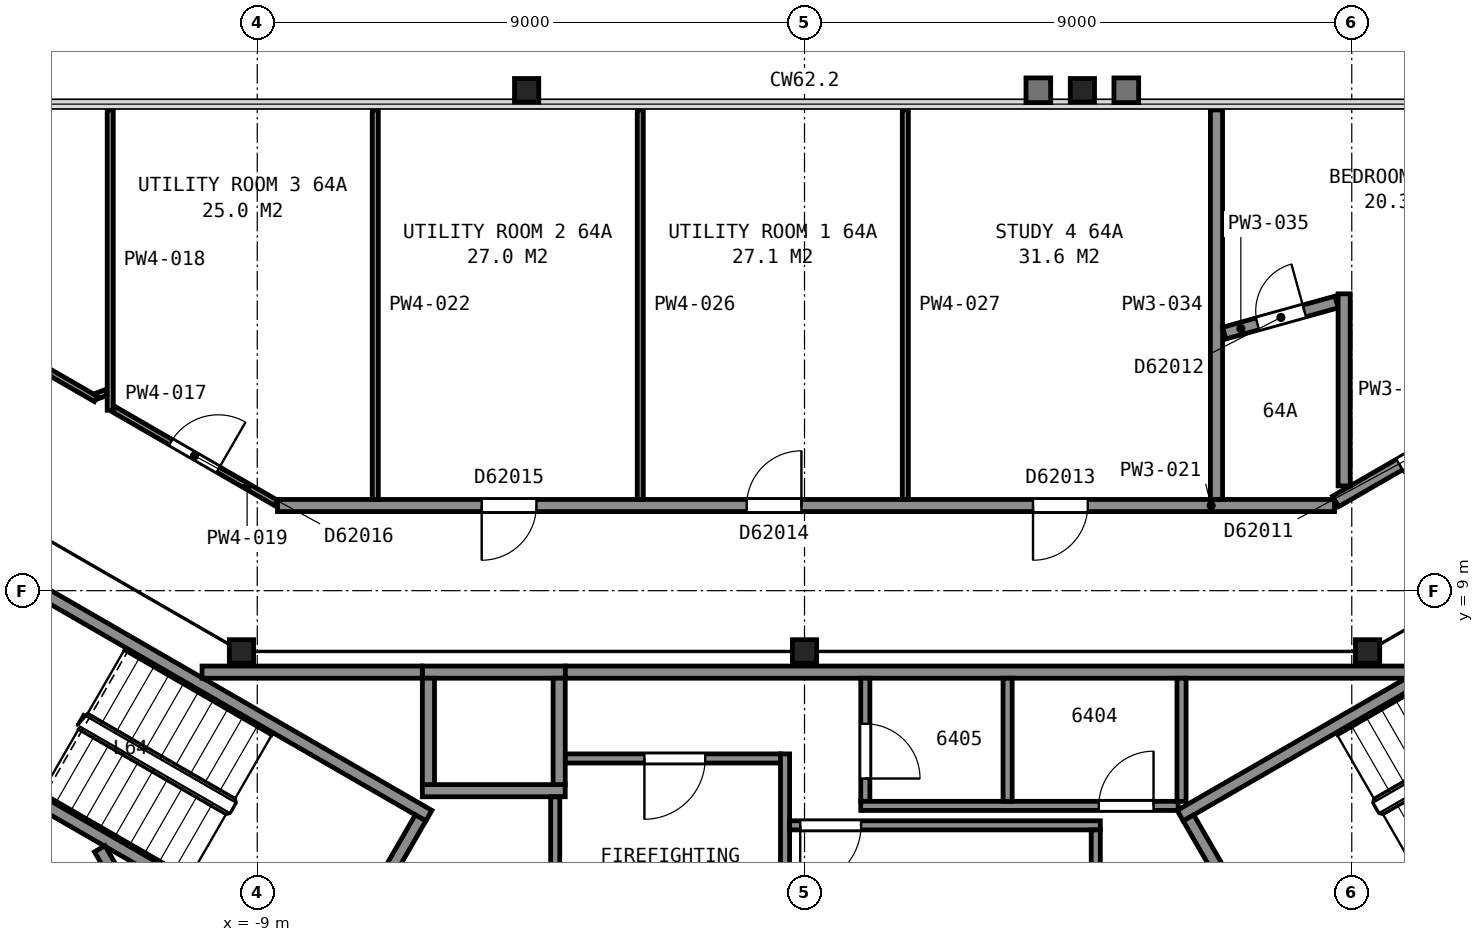
"""IFC4 building model, lengths in metres.
Left out: names, types, materials, properties, quantities, classifications, styles, units other than length and angle.
Written with IfcOpenShell. Run it as: python <this file> out.ifc"""

import sys

from ifc_helpers import new_model, si_unit, direction, frame, frame_2d, origin, origin_2d, place, context, subcontext, project, spatial, rectangle, i_section, extrude, element, fill, save


model = new_model("IFC4")
c1 = context("Model", 3, precision=1e-05, world=origin(), true_north=direction((0.0, 1.0)))
c2 = subcontext(c1, "Body", "Model", "MODEL_VIEW")
j1 = project(units=[si_unit("LENGTHUNIT", "METRE"), si_unit("PLANEANGLEUNIT", "RADIAN")], contexts=[c1])
p1 = place(None, origin())
s1 = spatial("IfcSite", under=j1, at=p1, CompositionType="ELEMENT")
p2 = place(p1, origin())
s2 = spatial("IfcBuilding", under=s1, at=p2, CompositionType="ELEMENT")
p3 = place(p2, frame((0.0, 0.0, 254.5)))
s3 = spatial("IfcBuildingStorey", under=s2, at=p3, CompositionType="ELEMENT", Elevation=254.5)
for number, where, z_axis, x_axis in (
    (1, (4.57, 17.23, 0.0), (0.0, 0.0, 1.0), (1.0, 0.0, 0.0)),
    (2, (-4.57, 17.23, 0.0), (0.0, 0.0, 1.0), (1.0, 0.0, 0.0)),
):
    element("IfcColumn", number, at=place(p3, frame(where, z_axis=z_axis, x_axis=x_axis)), inside=s3, PredefinedType="COLUMN", context=c2, shape_type="SweptSolid", body=[
        extrude(i_section(OverallWidth=0.399, OverallDepth=0.386, WebThickness=0.021, FlangeThickness=0.033, FilletRadius=0.015, at=origin_2d()), origin(), (0.0, 0.0, 1.0), 3.01),
    ])
p4 = place(p3, frame((9.26, 8.0, 0.0), z_axis=(0.0, 0.0, 1.0), x_axis=(1.0, 0.0, 0.0)))
e3 = element("IfcColumn", 3, at=p4, inside=s3, PredefinedType="COLUMN", context=c2, shape_type="SweptSolid", body=[
    extrude(i_section(OverallWidth=0.399, OverallDepth=0.386, WebThickness=0.021, FlangeThickness=0.033, FilletRadius=0.015, at=origin_2d()), origin(), (0.0, 0.0, 1.0), 3.635),
])
p5 = place(p3, frame((0.0, 8.0, 0.0), z_axis=(0.0, 0.0, 1.0), x_axis=(1.0, 0.0, 0.0)))
e4 = element("IfcColumn", 4, at=p5, inside=s3, PredefinedType="COLUMN", context=c2, shape_type="SweptSolid", body=[
    extrude(i_section(OverallWidth=0.399, OverallDepth=0.386, WebThickness=0.021, FlangeThickness=0.033, FilletRadius=0.015, at=origin_2d()), origin(), (0.0, 0.0, 1.0), 3.67),
])
p6 = place(p3, frame((-9.26, 8.0, 0.0), z_axis=(0.0, 0.0, 1.0), x_axis=(1.0, 0.0, 0.0)))
e5 = element("IfcColumn", 5, at=p6, inside=s3, PredefinedType="COLUMN", context=c2, shape_type="SweptSolid", body=[
    extrude(i_section(OverallWidth=0.399, OverallDepth=0.386, WebThickness=0.021, FlangeThickness=0.033, FilletRadius=0.015, at=origin_2d()), origin(), (0.0, 0.0, 1.0), 3.635),
])
for number, where, z_axis, x_axis in (
    (6, (6.178, 5.299, 0.0), (0.0, 0.0, 1.0), (0.866, 0.5, 0.0)),
    (7, (7.678, 2.701, 0.0), (0.0, 0.0, 1.0), (0.866, 0.5, 0.0)),
):
    element("IfcWall", number, at=place(p3, frame(where, z_axis=z_axis, x_axis=x_axis)), inside=s3, PredefinedType="PARTITIONING", context=c2, shape_type="SweptSolid", body=[
        extrude(rectangle(XDim=9.6, YDim=0.2, at=frame_2d((4.8, 0.0))), origin(), (0.0, 0.0, 1.0), 3.45),
    ])
p7 = place(p3, frame((7.715, 2.838, 0.0), z_axis=(0.0, 0.0, 1.0), x_axis=(-0.500049511043, 0.865996816683, 0.0)))
e8 = element("IfcWall", 8, at=p7, inside=s3, PredefinedType="PARTITIONING", context=c2, shape_type="SweptSolid", body=[
    extrude(rectangle(XDim=2.8, YDim=0.2, at=frame_2d((1.4, 0.0))), origin(), (0.0, 0.0, 1.0), 3.45),
])
for number, where, z_axis, x_axis in (
    (9, (-7.678, 2.701, 0.0), (0.0, 0.0, 1.0), (-0.866, 0.5, 0.0)),
    (10, (-6.178, 5.299, 0.0), (0.0, 0.0, 1.0), (-0.866, 0.5, 0.0)),
):
    element("IfcWall", number, at=place(p3, frame(where, z_axis=z_axis, x_axis=x_axis)), inside=s3, PredefinedType="PARTITIONING", context=c2, shape_type="SweptSolid", body=[
        extrude(rectangle(XDim=9.6, YDim=0.2, at=frame_2d((4.8, 0.0))), origin(), (0.0, 0.0, 1.0), 3.45),
    ])
p8 = place(p3, frame((-6.315, 5.262, 0.0), z_axis=(0.0, 0.0, 1.0), x_axis=(-0.500049511043, -0.865996816683, 0.0)))
e11 = element("IfcWall", 11, at=p8, inside=s3, PredefinedType="PARTITIONING", context=c2, shape_type="SweptSolid", body=[
    extrude(rectangle(XDim=2.8, YDim=0.2, at=frame_2d((1.4, 0.0))), origin(), (0.0, 0.0, 1.0), 3.45),
])
for number, where, z_axis, x_axis in (
    (12, (-6.285, 5.71, 0.0), (0.0, 0.0, 1.0), (1.0, 0.0, 0.0)),
    (13, (-6.285, 7.66, 0.0), (0.0, 0.0, 1.0), (1.0, 0.0, 0.0)),
):
    element("IfcWall", number, at=place(p3, frame(where, z_axis=z_axis, x_axis=x_axis)), inside=s3, PredefinedType="PARTITIONING", context=c2, shape_type="SweptSolid", body=[
        extrude(rectangle(XDim=2.35, YDim=0.2, at=frame_2d((1.175, 0.0))), origin(), (0.0, 0.0, 1.0), 3.7),
    ])
for number, where, z_axis, x_axis in (
    (14, (-4.035, 5.81, 0.0), (0.0, 0.0, 1.0), (0.0, 1.0, 0.0)),
    (15, (-6.185, 5.81, 0.0), (0.0, 0.0, 1.0), (0.0, 1.0, 0.0)),
):
    element("IfcWall", number, at=place(p3, frame(where, z_axis=z_axis, x_axis=x_axis)), inside=s3, PredefinedType="PARTITIONING", context=c2, shape_type="SweptSolid", body=[
        extrude(rectangle(XDim=1.75, YDim=0.2, at=frame_2d((0.875, 0.0))), origin(), (0.0, 0.0, 1.0), 3.7),
    ])
p9 = place(p3, frame((-11.591, 4.755, 0.0), z_axis=(0.0, 0.0, 1.0), x_axis=(0.500043977787, -0.866000011708, 0.0)))
e16 = element("IfcWall", 16, at=p9, inside=s3, PredefinedType="PARTITIONING", context=c2, shape_type="SweptSolid", body=[
    extrude(rectangle(XDim=6.617, YDim=0.2, at=frame_2d((3.308, 0.0))), origin(), (0.0, 0.0, 1.0), 3.45),
])
p10 = place(p9, frame((3.695, 0.0, 0.0)))
e17 = element("IfcOpeningElement", 17, at=p10, cuts=e16, PredefinedType="OPENING", context=c2, shape_type="SweptSolid", body=[
    extrude(rectangle(XDim=1.8, YDim=2.1, at=frame_2d((0.9, 1.05))), frame((0.0, 0.11, 0.0), z_axis=(0.0, -1.0, 0.0), x_axis=(1.0, 0.0, 0.0)), (0.0, 0.0, 1.0), 0.22),
])
p11 = place(p3, frame((-9.908, 7.66, 0.0), z_axis=(0.0, 0.0, 1.0), x_axis=(1.0, 0.0, 0.0)))
e18 = element("IfcWall", 18, at=p11, inside=s3, PredefinedType="PARTITIONING", context=c2, shape_type="SweptSolid", body=[
    extrude(rectangle(XDim=3.621, YDim=0.2, at=frame_2d((1.811, 0.0))), origin(), (0.0, 0.0, 1.0), 3.45),
])
p12 = place(p3, frame((-4.1, 2.085, 0.0), z_axis=(0.0, 0.0, 1.0), x_axis=(0.0, 1.0, 0.0)))
e19 = element("IfcWall", 19, at=p12, inside=s3, PredefinedType="PARTITIONING", context=c2, shape_type="SweptSolid", body=[
    extrude(rectangle(XDim=3.523, YDim=0.15, at=frame_2d((1.761, 0.0))), origin(), (0.0, 0.0, 1.0), 3.45),
])
p13 = place(p3, frame((-3.933, 6.24, 0.0), z_axis=(0.0, 0.0, 1.0), x_axis=(1.0, 0.0, 0.0)))
e20 = element("IfcWall", 20, at=p13, inside=s3, PredefinedType="PARTITIONING", context=c2, shape_type="SweptSolid", body=[
    extrude(rectangle(XDim=3.538, YDim=0.15, at=frame_2d((1.769, 0.0))), origin(), (0.0, 0.0, 1.0), 3.45),
])
p14 = place(p13, frame((1.3, 0.0, 0.0)))
e21 = element("IfcOpeningElement", 21, at=p14, cuts=e20, PredefinedType="OPENING", context=c2, shape_type="SweptSolid", body=[
    extrude(rectangle(XDim=1.0, YDim=2.1, at=frame_2d((0.5, 1.05))), frame((0.0, 0.085, 0.0), z_axis=(0.0, -1.0, 0.0), x_axis=(1.0, 0.0, 0.0)), (0.0, 0.0, 1.0), 0.17),
])
p15 = place(p3, frame((-3.933, 7.66, 0.0), z_axis=(0.0, 0.0, 1.0), x_axis=(1.0, 0.0, 0.0)))
e22 = element("IfcWall", 22, at=p15, inside=s3, PredefinedType="PARTITIONING", context=c2, shape_type="SweptSolid", body=[
    extrude(rectangle(XDim=13.841, YDim=0.2, at=frame_2d((6.92, 0.0))), origin(), (0.0, 0.0, 1.0), 3.45),
])
p16 = place(p3, frame((-0.32, 2.252, 0.0), z_axis=(0.0, 0.0, 1.0), x_axis=(0.0, 1.0, 0.0)))
e23 = element("IfcWall", 23, at=p16, inside=s3, PredefinedType="PARTITIONING", context=c2, shape_type="SweptSolid", body=[
    extrude(rectangle(XDim=4.063, YDim=0.15, at=frame_2d((2.031, 0.0))), origin(), (0.0, 0.0, 1.0), 3.45),
])
p17 = place(p3, frame((-0.245, 5.14, 0.0), z_axis=(0.0, 0.0, 1.0), x_axis=(1.0, 0.0, 0.0)))
e24 = element("IfcWall", 24, at=p17, inside=s3, PredefinedType="PARTITIONING", context=c2, shape_type="SweptSolid", body=[
    extrude(rectangle(XDim=5.11, YDim=0.15, at=frame_2d((2.555, 0.0))), origin(), (0.0, 0.0, 1.0), 3.45),
])
p18 = place(p17, frame((0.175, 0.0, 0.0)))
e25 = element("IfcOpeningElement", 25, at=p18, cuts=e24, PredefinedType="OPENING", context=c2, shape_type="SweptSolid", body=[
    extrude(rectangle(XDim=1.0, YDim=2.1, at=frame_2d((0.5, 1.05))), frame((0.0, 0.085, 0.0), z_axis=(0.0, -1.0, 0.0), x_axis=(1.0, 0.0, 0.0)), (0.0, 0.0, 1.0), 0.17),
])
p19 = place(p3, frame((1.0, 7.56, 0.0), z_axis=(0.0, 0.0, 1.0), x_axis=(0.0, -1.0, 0.0)))
e26 = element("IfcWall", 26, at=p19, inside=s3, PredefinedType="PARTITIONING", context=c2, shape_type="SweptSolid", body=[
    extrude(rectangle(XDim=2.025, YDim=0.15, at=frame_2d((1.013, 0.0))), origin(), (0.0, 0.0, 1.0), 3.45),
])
p20 = place(p19, frame((0.75, 0.0, 0.0)))
e27 = element("IfcOpeningElement", 27, at=p20, cuts=e26, PredefinedType="OPENING", context=c2, shape_type="SweptSolid", body=[
    extrude(rectangle(XDim=0.9, YDim=2.1, at=frame_2d((0.45, 1.05))), frame((0.0, 0.085, 0.0), z_axis=(0.0, -1.0, 0.0), x_axis=(1.0, 0.0, 0.0)), (0.0, 0.0, 1.0), 0.17),
])
p21 = place(p3, frame((0.925, 5.46, 0.0), z_axis=(0.0, 0.0, 1.0), x_axis=(1.0, 0.0, 0.0)))
e28 = element("IfcWall", 28, at=p21, inside=s3, PredefinedType="PARTITIONING", context=c2, shape_type="SweptSolid", body=[
    extrude(rectangle(XDim=5.22, YDim=0.15, at=frame_2d((2.61, 0.0))), origin(), (0.0, 0.0, 1.0), 3.45),
])
p22 = place(p21, frame((3.915, 0.0, 0.0)))
e29 = element("IfcOpeningElement", 29, at=p22, cuts=e28, PredefinedType="OPENING", context=c2, shape_type="SweptSolid", body=[
    extrude(rectangle(XDim=0.9, YDim=2.1, at=frame_2d((0.45, 1.05))), frame((0.0, 0.085, 0.0), z_axis=(0.0, -1.0, 0.0), x_axis=(1.0, 0.0, 0.0)), (0.0, 0.0, 1.0), 0.17),
])
p23 = place(p3, frame((3.34, 5.535, 0.0), z_axis=(0.0, 0.0, 1.0), x_axis=(0.0, 1.0, 0.0)))
e30 = element("IfcWall", 30, at=p23, inside=s3, PredefinedType="PARTITIONING", context=c2, shape_type="SweptSolid", body=[
    extrude(rectangle(XDim=2.025, YDim=0.15, at=frame_2d((1.013, 0.0))), origin(), (0.0, 0.0, 1.0), 3.45),
])
p24 = place(p3, frame((4.79, 2.085, 0.0), z_axis=(0.0, 0.0, 1.0), x_axis=(0.0, 1.0, 0.0)))
e31 = element("IfcWall", 31, at=p24, inside=s3, PredefinedType="PARTITIONING", context=c2, shape_type="SweptSolid", body=[
    extrude(rectangle(XDim=2.98, YDim=0.15, at=frame_2d((1.49, 0.0))), origin(), (0.0, 0.0, 1.0), 3.45),
])
p25 = place(p3, frame((6.2, 5.535, 0.0), z_axis=(0.0, 0.0, 1.0), x_axis=(0.0, 1.0, 0.0)))
e32 = element("IfcWall", 32, at=p25, inside=s3, PredefinedType="PARTITIONING", context=c2, shape_type="SweptSolid", body=[
    extrude(rectangle(XDim=2.025, YDim=0.15, at=frame_2d((1.013, 0.0))), origin(), (0.0, 0.0, 1.0), 3.45),
])
p26 = place(p3, frame((9.803, 1.658, 0.0), z_axis=(0.0, 0.0, 1.0), x_axis=(0.499943114462, 0.866058244174, 0.0)))
e33 = element("IfcWall", 33, at=p26, inside=s3, PredefinedType="PARTITIONING", context=c2, shape_type="SweptSolid", body=[
    extrude(rectangle(XDim=3.576, YDim=0.2, at=frame_2d((1.788, 0.0))), origin(), (0.0, 0.0, 1.0), 3.45),
])
p27 = place(p3, frame((-16.055, 14.693, 0.0), z_axis=(0.0, 0.0, 1.0), x_axis=(0.866094383736, -0.499880504182, 0.0)))
e34 = element("IfcWall", 34, at=p27, inside=s3, PredefinedType="PARTITIONING", context=c2, shape_type="SweptSolid", body=[
    extrude(rectangle(XDim=5.081, YDim=0.1, at=frame_2d((2.541, 0.0))), origin(), (0.0, 0.0, 1.0), 2.362),
])
p28 = place(p3, frame((-11.632, 12.203, 0.0), z_axis=(0.0, 0.0, 1.0), x_axis=(0.934710776834, 0.355409290354, 0.0)))
e35 = element("IfcWall", 35, at=p28, inside=s3, PredefinedType="PARTITIONING", context=c2, shape_type="SweptSolid", body=[
    extrude(rectangle(XDim=0.156, YDim=0.1, at=frame_2d((0.078, 0.0))), origin(), (0.0, 0.0, 1.0), 2.362),
])
p29 = place(p3, frame((-11.418, 11.967, 0.0), z_axis=(0.0, 0.0, 1.0), x_axis=(0.0, 1.0, 0.0)))
e36 = element("IfcWall", 36, at=p29, inside=s3, PredefinedType="PARTITIONING", context=c2, shape_type="SweptSolid", body=[
    extrude(rectangle(XDim=4.939, YDim=0.1, at=frame_2d((2.469, 0.0))), origin(), (0.0, 0.0, 1.0), 2.362),
])
p30 = place(p3, frame((-11.357, 11.982, 0.0), z_axis=(0.0, 0.0, 1.0), x_axis=(0.866039032844, -0.499976393034, 0.0)))
e37 = element("IfcWall", 37, at=p30, inside=s3, PredefinedType="PARTITIONING", context=c2, shape_type="SweptSolid", body=[
    extrude(rectangle(XDim=3.079, YDim=0.1, at=frame_2d((1.54, 0.0))), origin(), (0.0, 0.0, 1.0), 2.362),
])
p31 = place(p30, frame((1.08, 0.0, 0.0)))
e38 = element("IfcOpeningElement", 38, at=p31, cuts=e37, PredefinedType="OPENING", context=c2, shape_type="SweptSolid", body=[
    extrude(rectangle(XDim=0.9, YDim=2.1, at=frame_2d((0.45, 1.05))), frame((0.0, 0.06, 0.0), z_axis=(0.0, -1.0, 0.0), x_axis=(1.0, 0.0, 0.0)), (0.0, 0.0, 1.0), 0.12),
])
p32 = place(p3, frame((-8.667, 10.4, 0.0), z_axis=(0.0, 0.0, 1.0), x_axis=(1.0, 0.0, 0.0)))
e39 = element("IfcWall", 39, at=p32, inside=s3, PredefinedType="PARTITIONING", context=c2, shape_type="SweptSolid", body=[
    extrude(rectangle(XDim=17.384, YDim=0.2, at=frame_2d((8.692, 0.0))), origin(), (0.0, 0.0, 1.0), 2.362),
])
p33 = place(p32, frame((12.425, 0.0, 0.0)))
e40 = element("IfcOpeningElement", 40, at=p33, cuts=e39, PredefinedType="OPENING", context=c2, shape_type="SweptSolid", body=[
    extrude(rectangle(XDim=0.9, YDim=2.1, at=frame_2d((0.45, 1.05))), frame((0.0, 0.11, 0.0), z_axis=(0.0, -1.0, 0.0), x_axis=(1.0, 0.0, 0.0)), (0.0, 0.0, 1.0), 0.22),
])
p34 = place(p32, frame((7.716, 0.0, 0.0)))
e41 = element("IfcOpeningElement", 41, at=p34, cuts=e39, PredefinedType="OPENING", context=c2, shape_type="SweptSolid", body=[
    extrude(rectangle(XDim=0.9, YDim=2.1, at=frame_2d((0.45, 1.05))), frame((0.0, 0.11, 0.0), z_axis=(0.0, -1.0, 0.0), x_axis=(1.0, 0.0, 0.0)), (0.0, 0.0, 1.0), 0.22),
])
p35 = place(p32, frame((3.358, 0.0, 0.0)))
e42 = element("IfcOpeningElement", 42, at=p35, cuts=e39, PredefinedType="OPENING", context=c2, shape_type="SweptSolid", body=[
    extrude(rectangle(XDim=0.9, YDim=2.1, at=frame_2d((0.45, 1.05))), frame((0.0, 0.11, 0.0), z_axis=(0.0, -1.0, 0.0), x_axis=(1.0, 0.0, 0.0)), (0.0, 0.0, 1.0), 0.22),
])
for number, where, z_axis, x_axis in (
    (43, (-7.059, 10.5, 0.0), (0.0, 0.0, 1.0), (0.0, 1.0, 0.0)),
    (44, (-2.701, 10.5, 0.0), (0.0, 0.0, 1.0), (0.0, 1.0, 0.0)),
    (45, (1.658, 10.5, 0.0), (0.0, 0.0, 1.0), (0.0, 1.0, 0.0)),
):
    element("IfcWall", number, at=place(p3, frame(where, z_axis=z_axis, x_axis=x_axis)), inside=s3, PredefinedType="PARTITIONING", context=c2, shape_type="SweptSolid", body=[
        extrude(rectangle(XDim=6.406, YDim=0.1, at=frame_2d((3.203, 0.0))), origin(), (0.0, 0.0, 1.0), 2.362),
    ])
p36 = place(p3, frame((6.775, 10.5, 0.0), z_axis=(0.0, 0.0, 1.0), x_axis=(0.0, 1.0, 0.0)))
e46 = element("IfcWall", 46, at=p36, inside=s3, PredefinedType="PARTITIONING", context=c2, shape_type="SweptSolid", body=[
    extrude(rectangle(XDim=6.406, YDim=0.2, at=frame_2d((3.203, 0.0))), origin(), (0.0, 0.0, 1.0), 2.362),
])
p37 = place(p3, frame((8.75, 13.747, 0.0), z_axis=(0.0, 0.0, 1.0), x_axis=(-0.963674591663, -0.267079166884, 0.0)))
e47 = element("IfcWall", 47, at=p37, inside=s3, PredefinedType="PARTITIONING", context=c2, shape_type="SweptSolid", body=[
    extrude(rectangle(XDim=1.918, YDim=0.2, at=frame_2d((0.959, 0.0))), origin(), (0.0, 0.0, 1.0), 2.362),
])
p38 = place(p37, frame((0.549, 0.0, 0.0)))
e48 = element("IfcOpeningElement", 48, at=p38, cuts=e47, PredefinedType="OPENING", context=c2, shape_type="SweptSolid", body=[
    extrude(rectangle(XDim=0.8, YDim=2.1, at=frame_2d((0.4, 1.05))), frame((0.0, 0.11, 0.0), z_axis=(0.0, -1.0, 0.0), x_axis=(1.0, 0.0, 0.0)), (0.0, 0.0, 1.0), 0.22),
])
p39 = place(p3, frame((8.734, 10.468, 0.0), z_axis=(0.0, 0.0, 1.0), x_axis=(0.86608074249, 0.499904138298, 0.0)))
e49 = element("IfcWall", 49, at=p39, inside=s3, PredefinedType="PARTITIONING", context=c2, shape_type="SweptSolid", body=[
    extrude(rectangle(XDim=8.453, YDim=0.2, at=frame_2d((4.227, 0.0))), origin(), (0.0, 0.0, 1.0), 2.362),
])
p40 = place(p39, frame((5.209, 0.0, 0.0)))
e50 = element("IfcOpeningElement", 50, at=p40, cuts=e49, PredefinedType="OPENING", context=c2, shape_type="SweptSolid", body=[
    extrude(rectangle(XDim=0.9, YDim=2.1, at=frame_2d((0.45, 1.05))), frame((0.0, 0.11, 0.0), z_axis=(0.0, -1.0, 0.0), x_axis=(1.0, 0.0, 0.0)), (0.0, 0.0, 1.0), 0.22),
])
p41 = place(p39, frame((1.213, 0.0, 0.0)))
e51 = element("IfcOpeningElement", 51, at=p41, cuts=e49, PredefinedType="OPENING", context=c2, shape_type="SweptSolid", body=[
    extrude(rectangle(XDim=0.9, YDim=2.1, at=frame_2d((0.45, 1.05))), frame((0.0, 0.11, 0.0), z_axis=(0.0, -1.0, 0.0), x_axis=(1.0, 0.0, 0.0)), (0.0, 0.0, 1.0), 0.22),
])
p42 = place(p3, frame((8.875, 10.722, 0.0), z_axis=(0.0, 0.0, 1.0), x_axis=(0.0, 1.0, 0.0)))
e52 = element("IfcWall", 52, at=p42, inside=s3, PredefinedType="PARTITIONING", context=c2, shape_type="SweptSolid", body=[
    extrude(rectangle(XDim=3.16, YDim=0.2, at=frame_2d((1.58, 0.0))), origin(), (0.0, 0.0, 1.0), 2.362),
])
p43 = place(p14, origin())
e53 = element("IfcDoor", 53, at=p43, inside=s3, OperationType="SINGLE_SWING_LEFT", PredefinedType="DOOR", context=c2, shape_type="SweptSolid", body=[
    extrude(rectangle(XDim=1.0, YDim=2.1, at=frame_2d((0.5, 1.05))), frame((0.0, 0.025, 0.0), z_axis=(0.0, -1.0, 0.0), x_axis=(1.0, 0.0, 0.0)), (0.0, 0.0, 1.0), 0.05),
])
fill(e21, e53)
p44 = place(p18, origin())
e54 = element("IfcDoor", 54, at=p44, inside=s3, OperationType="SINGLE_SWING_LEFT", PredefinedType="DOOR", context=c2, shape_type="SweptSolid", body=[
    extrude(rectangle(XDim=1.0, YDim=2.1, at=frame_2d((0.5, 1.05))), frame((0.0, 0.025, 0.0), z_axis=(0.0, -1.0, 0.0), x_axis=(1.0, 0.0, 0.0)), (0.0, 0.0, 1.0), 0.05),
])
fill(e25, e54)
p45 = place(p20, origin())
e55 = element("IfcDoor", 55, at=p45, inside=s3, OperationType="SINGLE_SWING_RIGHT", PredefinedType="DOOR", context=c2, shape_type="SweptSolid", body=[
    extrude(rectangle(XDim=0.9, YDim=2.1, at=frame_2d((0.45, 1.05))), frame((0.0, 0.025, 0.0), z_axis=(0.0, -1.0, 0.0), x_axis=(1.0, 0.0, 0.0)), (0.0, 0.0, 1.0), 0.05),
])
fill(e27, e55)
p46 = place(p22, origin())
e56 = element("IfcDoor", 56, at=p46, inside=s3, OperationType="SINGLE_SWING_RIGHT", PredefinedType="DOOR", context=c2, shape_type="SweptSolid", body=[
    extrude(rectangle(XDim=0.9, YDim=2.1, at=frame_2d((0.45, 1.05))), frame((0.0, 0.025, 0.0), z_axis=(0.0, -1.0, 0.0), x_axis=(1.0, 0.0, 0.0)), (0.0, 0.0, 1.0), 0.05),
])
fill(e29, e56)
p47 = place(p31, origin())
e57 = element("IfcDoor", 57, at=p47, inside=s3, OperationType="SINGLE_SWING_RIGHT", PredefinedType="DOOR", context=c2, shape_type="SweptSolid", body=[
    extrude(rectangle(XDim=0.9, YDim=2.1, at=frame_2d((0.45, 1.05))), frame((0.0, 0.025, 0.0), z_axis=(0.0, -1.0, 0.0), x_axis=(1.0, 0.0, 0.0)), (0.0, 0.0, 1.0), 0.05),
])
fill(e38, e57)
p48 = place(p33, origin())
e58 = element("IfcDoor", 58, at=p48, inside=s3, OperationType="SINGLE_SWING_LEFT", PredefinedType="DOOR", context=c2, shape_type="SweptSolid", body=[
    extrude(rectangle(XDim=0.9, YDim=2.1, at=frame_2d((0.45, 1.05))), frame((0.0, 0.025, 0.0), z_axis=(0.0, -1.0, 0.0), x_axis=(1.0, 0.0, 0.0)), (0.0, 0.0, 1.0), 0.05),
])
fill(e40, e58)
p49 = place(p34, origin())
e59 = element("IfcDoor", 59, at=p49, inside=s3, OperationType="SINGLE_SWING_RIGHT", PredefinedType="DOOR", context=c2, shape_type="SweptSolid", body=[
    extrude(rectangle(XDim=0.9, YDim=2.1, at=frame_2d((0.45, 1.05))), frame((0.0, 0.025, 0.0), z_axis=(0.0, -1.0, 0.0), x_axis=(1.0, 0.0, 0.0)), (0.0, 0.0, 1.0), 0.05),
])
fill(e41, e59)
p50 = place(p35, origin())
e60 = element("IfcDoor", 60, at=p50, inside=s3, OperationType="SINGLE_SWING_LEFT", PredefinedType="DOOR", context=c2, shape_type="SweptSolid", body=[
    extrude(rectangle(XDim=0.9, YDim=2.1, at=frame_2d((0.45, 1.05))), frame((0.0, 0.025, 0.0), z_axis=(0.0, -1.0, 0.0), x_axis=(1.0, 0.0, 0.0)), (0.0, 0.0, 1.0), 0.05),
])
fill(e42, e60)
p51 = place(p38, origin())
e61 = element("IfcDoor", 61, at=p51, inside=s3, OperationType="SINGLE_SWING_LEFT", PredefinedType="DOOR", context=c2, shape_type="SweptSolid", body=[
    extrude(rectangle(XDim=0.8, YDim=2.1, at=frame_2d((0.4, 1.05))), frame((0.0, 0.025, 0.0), z_axis=(0.0, -1.0, 0.0), x_axis=(1.0, 0.0, 0.0)), (0.0, 0.0, 1.0), 0.05),
])
fill(e48, e61)
p52 = place(p41, origin())
e62 = element("IfcDoor", 62, at=p52, inside=s3, OperationType="SINGLE_SWING_LEFT", PredefinedType="DOOR", context=c2, shape_type="SweptSolid", body=[
    extrude(rectangle(XDim=0.9, YDim=2.1, at=frame_2d((0.45, 1.05))), frame((0.0, 0.025, 0.0), z_axis=(0.0, -1.0, 0.0), x_axis=(1.0, 0.0, 0.0)), (0.0, 0.0, 1.0), 0.05),
])
fill(e51, e62)
save(model, sys.argv[1])
